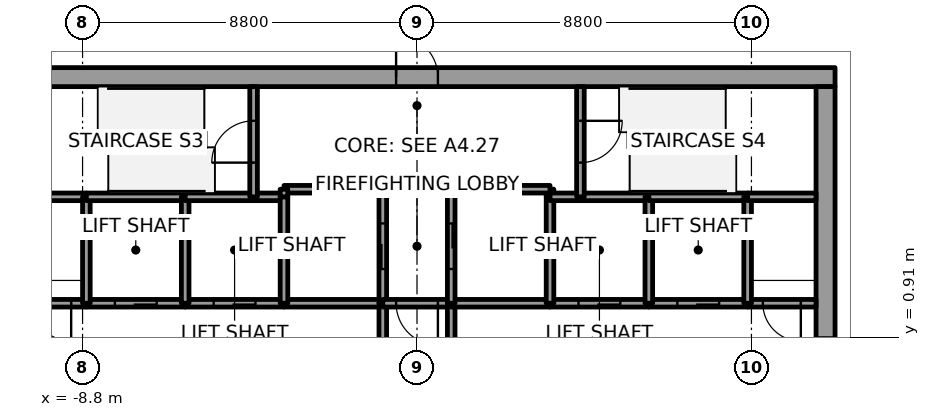
"""IFC4 building model, lengths in metres.
Left out: names, types, materials, properties, quantities, classifications, styles, units other than length and angle.
Written with IfcOpenShell. Run it as: python <this file> out.ifc"""

import sys

from ifc_helpers import new_model, si_unit, direction, frame, frame_2d, origin, place, context, subcontext, project, spatial, rectangle, extrude, element, fill, save


model = new_model("IFC4")
c1 = context("Model", 3, precision=1e-05, world=origin(), true_north=direction((0.0, 1.0)))
c2 = subcontext(c1, "Body", "Model", "MODEL_VIEW")
j1 = project(units=[si_unit("LENGTHUNIT", "METRE"), si_unit("PLANEANGLEUNIT", "RADIAN")], contexts=[c1])
p1 = place(None, origin())
s1 = spatial("IfcSite", under=j1, at=p1, CompositionType="ELEMENT")
p2 = place(p1, origin())
s2 = spatial("IfcBuilding", under=s1, at=p2, CompositionType="ELEMENT")
p3 = place(p2, frame((0.0, 0.0, 118.6)))
s3 = spatial("IfcBuildingStorey", under=s2, at=p3, CompositionType="ELEMENT", Elevation=118.6)
p4 = place(p3, frame((-11.0, 7.75, 0.0), z_axis=(0.0, 0.0, 1.0), x_axis=(1.0, 0.0, 0.0)))
e1 = element("IfcWall", 1, at=p4, inside=s3, PredefinedType="SHEAR", context=c2, shape_type="SweptSolid", body=[
    extrude(rectangle(XDim=22.0, YDim=0.5, at=frame_2d((11.0, 0.0))), origin(), (0.0, 0.0, 1.0), 7.2),
])
p5 = place(p4, frame((10.45, 0.0, 0.0)))
e2 = element("IfcOpeningElement", 2, at=p5, cuts=e1, PredefinedType="OPENING", context=c2, shape_type="SweptSolid", body=[
    extrude(rectangle(XDim=1.1, YDim=2.1, at=frame_2d((0.55, 1.05))), frame((0.0, 0.25, 0.0), z_axis=(0.0, -1.0, 0.0), x_axis=(1.0, 0.0, 0.0)), (0.0, 0.0, 1.0), 0.5),
])
p6 = place(p3, frame((10.75, -7.5, 0.0), z_axis=(0.0, 0.0, 1.0), x_axis=(0.0, 1.0, 0.0)))
e3 = element("IfcWall", 3, at=p6, inside=s3, PredefinedType="SHEAR", context=c2, shape_type="SweptSolid", body=[
    extrude(rectangle(XDim=15.0, YDim=0.5, at=frame_2d((7.5, 0.0))), origin(), (0.0, 0.0, 1.0), 7.2),
])
p7 = place(p6, frame((6.6, 0.0, 0.0)))
e4 = element("IfcOpeningElement", 4, at=p7, cuts=e3, PredefinedType="OPENING", context=c2, shape_type="SweptSolid", body=[
    extrude(rectangle(XDim=1.8, YDim=2.1, at=frame_2d((0.9, 1.05))), frame((0.0, 0.25, 0.0), z_axis=(0.0, -1.0, 0.0), x_axis=(1.0, 0.0, 0.0)), (0.0, 0.0, 1.0), 0.5),
])
p8 = place(p3, frame((-8.7, 1.8, 0.0), z_axis=(0.0, 0.0, 1.0), x_axis=(-1.0, 0.0, 0.0)))
e5 = element("IfcWall", 5, at=p8, inside=s3, PredefinedType="SOLIDWALL", context=c2, shape_type="SweptSolid", body=[
    extrude(rectangle(XDim=1.8, YDim=0.2, at=frame_2d((0.9, 0.0))), origin(), (0.0, 0.0, 1.0), 7.05),
])
p9 = place(p8, frame((0.4, 0.0, 0.0)))
e6 = element("IfcOpeningElement", 6, at=p9, cuts=e5, PredefinedType="OPENING", context=c2, shape_type="SweptSolid", body=[
    extrude(rectangle(XDim=1.0, YDim=2.1, at=frame_2d((0.5, 1.05))), frame((0.0, 0.1, 0.0), z_axis=(0.0, -1.0, 0.0), x_axis=(1.0, 0.0, 0.0)), (0.0, 0.0, 1.0), 0.2),
])
p10 = place(p3, frame((-8.7, 4.6, 0.0), z_axis=(0.0, 0.0, 1.0), x_axis=(-1.0, 0.0, 0.0)))
e7 = element("IfcWall", 7, at=p10, inside=s3, PredefinedType="SOLIDWALL", context=c2, shape_type="SweptSolid", body=[
    extrude(rectangle(XDim=1.8, YDim=0.2, at=frame_2d((0.9, 0.0))), origin(), (0.0, 0.0, 1.0), 7.05),
])
p11 = place(p3, frame((-6.1, 1.8, 0.0), z_axis=(0.0, 0.0, 1.0), x_axis=(-1.0, 0.0, 0.0)))
e8 = element("IfcWall", 8, at=p11, inside=s3, PredefinedType="SOLIDWALL", context=c2, shape_type="SweptSolid", body=[
    extrude(rectangle(XDim=2.6, YDim=0.2, at=frame_2d((1.3, 0.0))), origin(), (0.0, 0.0, 1.0), 7.05),
])
p12 = place(p11, frame((0.75, 0.0, 0.0)))
e9 = element("IfcOpeningElement", 9, at=p12, cuts=e8, PredefinedType="OPENING", context=c2, shape_type="SweptSolid", body=[
    extrude(rectangle(XDim=1.1, YDim=2.1, at=frame_2d((0.55, 1.05))), frame((0.0, 0.1, 0.0), z_axis=(0.0, -1.0, 0.0), x_axis=(1.0, 0.0, 0.0)), (0.0, 0.0, 1.0), 0.2),
])
p13 = place(p3, frame((-8.7, 1.8, 0.0), z_axis=(0.0, 0.0, 1.0), x_axis=(0.0, 1.0, 0.0)))
e10 = element("IfcWall", 10, at=p13, inside=s3, PredefinedType="SOLIDWALL", context=c2, shape_type="SweptSolid", body=[
    extrude(rectangle(XDim=2.8, YDim=0.2, at=frame_2d((1.4, 0.0))), origin(), (0.0, 0.0, 1.0), 7.05),
])
p14 = place(p3, frame((-6.1, 4.6, 0.0), z_axis=(0.0, 0.0, 1.0), x_axis=(-1.0, 0.0, 0.0)))
e11 = element("IfcWall", 11, at=p14, inside=s3, PredefinedType="SOLIDWALL", context=c2, shape_type="SweptSolid", body=[
    extrude(rectangle(XDim=2.6, YDim=0.2, at=frame_2d((1.3, 0.0))), origin(), (0.0, 0.0, 1.0), 7.05),
])
p15 = place(p3, frame((-3.5, 1.8, 0.0), z_axis=(0.0, 0.0, 1.0), x_axis=(-1.0, 0.0, 0.0)))
e12 = element("IfcWall", 12, at=p15, inside=s3, PredefinedType="SOLIDWALL", context=c2, shape_type="SweptSolid", body=[
    extrude(rectangle(XDim=2.6, YDim=0.2, at=frame_2d((1.3, 0.0))), origin(), (0.0, 0.0, 1.0), 7.05),
])
p16 = place(p15, frame((0.75, 0.0, 0.0)))
e13 = element("IfcOpeningElement", 13, at=p16, cuts=e12, PredefinedType="OPENING", context=c2, shape_type="SweptSolid", body=[
    extrude(rectangle(XDim=1.1, YDim=2.1, at=frame_2d((0.55, 1.05))), frame((0.0, 0.1, 0.0), z_axis=(0.0, -1.0, 0.0), x_axis=(1.0, 0.0, 0.0)), (0.0, 0.0, 1.0), 0.2),
])
p17 = place(p3, frame((-6.1, 1.8, 0.0), z_axis=(0.0, 0.0, 1.0), x_axis=(0.0, 1.0, 0.0)))
e14 = element("IfcWall", 14, at=p17, inside=s3, PredefinedType="SOLIDWALL", context=c2, shape_type="SweptSolid", body=[
    extrude(rectangle(XDim=2.8, YDim=0.2, at=frame_2d((1.4, 0.0))), origin(), (0.0, 0.0, 1.0), 7.05),
])
p18 = place(p3, frame((-4.3, 4.6, 0.0), z_axis=(0.0, 0.0, 1.0), x_axis=(-1.0, 0.0, 0.0)))
e15 = element("IfcWall", 15, at=p18, inside=s3, PredefinedType="SOLIDWALL", context=c2, shape_type="SweptSolid", body=[
    extrude(rectangle(XDim=1.8, YDim=0.2, at=frame_2d((0.9, 0.0))), origin(), (0.0, 0.0, 1.0), 7.05),
])
p19 = place(p3, frame((-3.5, 4.6, 0.0), z_axis=(0.0, 0.0, 1.0), x_axis=(-1.0, 0.0, 0.0)))
e16 = element("IfcWall", 16, at=p19, inside=s3, PredefinedType="SOLIDWALL", context=c2, shape_type="SweptSolid", body=[
    extrude(rectangle(XDim=0.8, YDim=0.2, at=frame_2d((0.4, 0.0))), origin(), (0.0, 0.0, 1.0), 7.05),
])
p20 = place(p3, frame((-4.3, 4.6, 0.0), z_axis=(0.0, 0.0, 1.0), x_axis=(0.0, 1.0, 0.0)))
e17 = element("IfcWall", 17, at=p20, inside=s3, PredefinedType="SOLIDWALL", context=c2, shape_type="SweptSolid", body=[
    extrude(rectangle(XDim=2.9, YDim=0.2, at=frame_2d((1.45, 0.0))), origin(), (0.0, 0.0, 1.0), 7.05),
])
p21 = place(p20, frame((0.9, 0.0, 0.0)))
e18 = element("IfcOpeningElement", 18, at=p21, cuts=e17, PredefinedType="OPENING", context=c2, shape_type="SweptSolid", body=[
    extrude(rectangle(XDim=1.1, YDim=2.1, at=frame_2d((0.55, 1.05))), frame((0.0, 0.1, 0.0), z_axis=(0.0, -1.0, 0.0), x_axis=(1.0, 0.0, 0.0)), (0.0, 0.0, 1.0), 0.2),
])
p22 = place(p3, frame((-0.9, 1.8, 0.0), z_axis=(0.0, 0.0, 1.0), x_axis=(-1.0, 0.0, 0.0)))
e19 = element("IfcWall", 19, at=p22, inside=s3, PredefinedType="SOLIDWALL", context=c2, shape_type="SweptSolid", body=[
    extrude(rectangle(XDim=2.6, YDim=0.2, at=frame_2d((1.3, 0.0))), origin(), (0.0, 0.0, 1.0), 7.05),
])
p23 = place(p3, frame((-3.5, 4.6, 0.0), z_axis=(0.0, 0.0, 1.0), x_axis=(0.0, -1.0, 0.0)))
e20 = element("IfcWall", 20, at=p23, inside=s3, PredefinedType="SOLIDWALL", context=c2, shape_type="SweptSolid", body=[
    extrude(rectangle(XDim=2.8, YDim=0.2, at=frame_2d((1.4, 0.0))), origin(), (0.0, 0.0, 1.0), 7.05),
])
p24 = place(p3, frame((-0.9, 1.8, 0.0), z_axis=(0.0, 0.0, 1.0), x_axis=(0.0, 1.0, 0.0)))
e21 = element("IfcWall", 21, at=p24, inside=s3, PredefinedType="SOLIDWALL", context=c2, shape_type="SweptSolid", body=[
    extrude(rectangle(XDim=3.0, YDim=0.2, at=frame_2d((1.5, 0.0))), origin(), (0.0, 0.0, 1.0), 7.05),
])
p25 = place(p24, frame((0.9, 0.0, 0.0)))
e22 = element("IfcOpeningElement", 22, at=p25, cuts=e21, PredefinedType="OPENING", context=c2, shape_type="SweptSolid", body=[
    extrude(rectangle(XDim=1.2, YDim=2.1, at=frame_2d((0.6, 1.05))), frame((0.0, 0.1, 0.0), z_axis=(0.0, -1.0, 0.0), x_axis=(1.0, 0.0, 0.0)), (0.0, 0.0, 1.0), 0.2),
])
p26 = place(p3, frame((-0.9, 4.8, 0.0), z_axis=(0.0, 0.0, 1.0), x_axis=(-1.0, 0.0, 0.0)))
e23 = element("IfcWall", 23, at=p26, inside=s3, PredefinedType="SOLIDWALL", context=c2, shape_type="SweptSolid", body=[
    extrude(rectangle(XDim=2.6, YDim=0.2, at=frame_2d((1.3, 0.0))), origin(), (0.0, 0.0, 1.0), 7.05),
])
p27 = place(p3, frame((-3.5, 4.8, 0.0), z_axis=(0.0, 0.0, 1.0), x_axis=(0.0, -1.0, 0.0)))
e24 = element("IfcWall", 24, at=p27, inside=s3, PredefinedType="SOLIDWALL", context=c2, shape_type="SweptSolid", body=[
    extrude(rectangle(XDim=0.2, YDim=0.2, at=frame_2d((0.1, 0.0))), origin(), (0.0, 0.0, 1.0), 7.05),
])
p28 = place(p3, frame((-0.9, 1.8, 0.0), z_axis=(0.0, 0.0, 1.0), x_axis=(0.0, -1.0, 0.0)))
e25 = element("IfcWall", 25, at=p28, inside=s3, PredefinedType="SOLIDWALL", context=c2, shape_type="SweptSolid", body=[
    extrude(rectangle(XDim=3.6, YDim=0.2, at=frame_2d((1.8, 0.0))), origin(), (0.0, 0.0, 1.0), 7.05),
])
p29 = place(p28, frame((1.05, 0.0, 0.0)))
e26 = element("IfcOpeningElement", 26, at=p29, cuts=e25, PredefinedType="OPENING", context=c2, shape_type="SweptSolid", body=[
    extrude(rectangle(XDim=1.5, YDim=2.1, at=frame_2d((0.75, 1.05))), frame((0.0, 0.1, 0.0), z_axis=(0.0, -1.0, 0.0), x_axis=(1.0, 0.0, 0.0)), (0.0, 0.0, 1.0), 0.2),
])
p30 = place(p3, frame((0.9, 1.8, 0.0), z_axis=(0.0, 0.0, 1.0), x_axis=(-1.0, 0.0, 0.0)))
e27 = element("IfcWall", 27, at=p30, inside=s3, PredefinedType="SOLIDWALL", context=c2, shape_type="SweptSolid", body=[
    extrude(rectangle(XDim=1.8, YDim=0.2, at=frame_2d((0.9, 0.0))), origin(), (0.0, 0.0, 1.0), 7.05),
])
p31 = place(p30, frame((0.35, 0.0, 0.0)))
e28 = element("IfcOpeningElement", 28, at=p31, cuts=e27, PredefinedType="OPENING", context=c2, shape_type="SweptSolid", body=[
    extrude(rectangle(XDim=1.1, YDim=2.1, at=frame_2d((0.55, 1.05))), frame((0.0, 0.1, 0.0), z_axis=(0.0, -1.0, 0.0), x_axis=(1.0, 0.0, 0.0)), (0.0, 0.0, 1.0), 0.2),
])
p32 = place(p3, frame((0.9, -1.8, 0.0), z_axis=(0.0, 0.0, 1.0), x_axis=(0.0, 1.0, 0.0)))
e29 = element("IfcWall", 29, at=p32, inside=s3, PredefinedType="SOLIDWALL", context=c2, shape_type="SweptSolid", body=[
    extrude(rectangle(XDim=3.6, YDim=0.2, at=frame_2d((1.8, 0.0))), origin(), (0.0, 0.0, 1.0), 7.05),
])
p33 = place(p32, frame((1.05, 0.0, 0.0)))
e30 = element("IfcOpeningElement", 30, at=p33, cuts=e29, PredefinedType="OPENING", context=c2, shape_type="SweptSolid", body=[
    extrude(rectangle(XDim=1.5, YDim=2.1, at=frame_2d((0.75, 1.05))), frame((0.0, 0.1, 0.0), z_axis=(0.0, -1.0, 0.0), x_axis=(1.0, 0.0, 0.0)), (0.0, 0.0, 1.0), 0.2),
])
p34 = place(p3, frame((3.5, 1.8, 0.0), z_axis=(0.0, 0.0, 1.0), x_axis=(-1.0, 0.0, 0.0)))
e31 = element("IfcWall", 31, at=p34, inside=s3, PredefinedType="SOLIDWALL", context=c2, shape_type="SweptSolid", body=[
    extrude(rectangle(XDim=2.6, YDim=0.2, at=frame_2d((1.3, 0.0))), origin(), (0.0, 0.0, 1.0), 7.05),
])
p35 = place(p3, frame((3.5, 4.6, 0.0), z_axis=(0.0, 0.0, 1.0), x_axis=(0.0, 1.0, 0.0)))
e32 = element("IfcWall", 32, at=p35, inside=s3, PredefinedType="SOLIDWALL", context=c2, shape_type="SweptSolid", body=[
    extrude(rectangle(XDim=0.2, YDim=0.2, at=frame_2d((0.1, 0.0))), origin(), (0.0, 0.0, 1.0), 7.05),
])
p36 = place(p3, frame((3.5, 4.8, 0.0), z_axis=(0.0, 0.0, 1.0), x_axis=(-1.0, 0.0, 0.0)))
e33 = element("IfcWall", 33, at=p36, inside=s3, PredefinedType="SOLIDWALL", context=c2, shape_type="SweptSolid", body=[
    extrude(rectangle(XDim=2.6, YDim=0.2, at=frame_2d((1.3, 0.0))), origin(), (0.0, 0.0, 1.0), 7.05),
])
p37 = place(p3, frame((0.9, 4.8, 0.0), z_axis=(0.0, 0.0, 1.0), x_axis=(0.0, -1.0, 0.0)))
e34 = element("IfcWall", 34, at=p37, inside=s3, PredefinedType="SOLIDWALL", context=c2, shape_type="SweptSolid", body=[
    extrude(rectangle(XDim=3.0, YDim=0.2, at=frame_2d((1.5, 0.0))), origin(), (0.0, 0.0, 1.0), 7.05),
])
p38 = place(p37, frame((0.9, 0.0, 0.0)))
e35 = element("IfcOpeningElement", 35, at=p38, cuts=e34, PredefinedType="OPENING", context=c2, shape_type="SweptSolid", body=[
    extrude(rectangle(XDim=1.2, YDim=2.1, at=frame_2d((0.6, 1.05))), frame((0.0, 0.1, 0.0), z_axis=(0.0, -1.0, 0.0), x_axis=(1.0, 0.0, 0.0)), (0.0, 0.0, 1.0), 0.2),
])
p39 = place(p3, frame((6.1, 1.8, 0.0), z_axis=(0.0, 0.0, 1.0), x_axis=(-1.0, 0.0, 0.0)))
e36 = element("IfcWall", 36, at=p39, inside=s3, PredefinedType="SOLIDWALL", context=c2, shape_type="SweptSolid", body=[
    extrude(rectangle(XDim=2.6, YDim=0.2, at=frame_2d((1.3, 0.0))), origin(), (0.0, 0.0, 1.0), 7.05),
])
p40 = place(p39, frame((0.75, 0.0, 0.0)))
e37 = element("IfcOpeningElement", 37, at=p40, cuts=e36, PredefinedType="OPENING", context=c2, shape_type="SweptSolid", body=[
    extrude(rectangle(XDim=1.1, YDim=2.1, at=frame_2d((0.55, 1.05))), frame((0.0, 0.1, 0.0), z_axis=(0.0, -1.0, 0.0), x_axis=(1.0, 0.0, 0.0)), (0.0, 0.0, 1.0), 0.2),
])
p41 = place(p3, frame((3.5, 1.8, 0.0), z_axis=(0.0, 0.0, 1.0), x_axis=(0.0, 1.0, 0.0)))
e38 = element("IfcWall", 38, at=p41, inside=s3, PredefinedType="SOLIDWALL", context=c2, shape_type="SweptSolid", body=[
    extrude(rectangle(XDim=2.8, YDim=0.2, at=frame_2d((1.4, 0.0))), origin(), (0.0, 0.0, 1.0), 7.05),
])
p42 = place(p3, frame((4.3, 4.6, 0.0), z_axis=(0.0, 0.0, 1.0), x_axis=(-1.0, 0.0, 0.0)))
e39 = element("IfcWall", 39, at=p42, inside=s3, PredefinedType="SOLIDWALL", context=c2, shape_type="SweptSolid", body=[
    extrude(rectangle(XDim=0.8, YDim=0.2, at=frame_2d((0.4, 0.0))), origin(), (0.0, 0.0, 1.0), 7.05),
])
p43 = place(p3, frame((6.1, 4.6, 0.0), z_axis=(0.0, 0.0, 1.0), x_axis=(-1.0, 0.0, 0.0)))
e40 = element("IfcWall", 40, at=p43, inside=s3, PredefinedType="SOLIDWALL", context=c2, shape_type="SweptSolid", body=[
    extrude(rectangle(XDim=1.8, YDim=0.2, at=frame_2d((0.9, 0.0))), origin(), (0.0, 0.0, 1.0), 7.05),
])
p44 = place(p3, frame((4.3, 7.5, 0.0), z_axis=(0.0, 0.0, 1.0), x_axis=(0.0, -1.0, 0.0)))
e41 = element("IfcWall", 41, at=p44, inside=s3, PredefinedType="SOLIDWALL", context=c2, shape_type="SweptSolid", body=[
    extrude(rectangle(XDim=2.9, YDim=0.2, at=frame_2d((1.45, 0.0))), origin(), (0.0, 0.0, 1.0), 7.05),
])
p45 = place(p44, frame((0.9, 0.0, 0.0)))
e42 = element("IfcOpeningElement", 42, at=p45, cuts=e41, PredefinedType="OPENING", context=c2, shape_type="SweptSolid", body=[
    extrude(rectangle(XDim=1.1, YDim=2.1, at=frame_2d((0.55, 1.05))), frame((0.0, 0.1, 0.0), z_axis=(0.0, -1.0, 0.0), x_axis=(1.0, 0.0, 0.0)), (0.0, 0.0, 1.0), 0.2),
])
p46 = place(p3, frame((8.7, 1.8, 0.0), z_axis=(0.0, 0.0, 1.0), x_axis=(-1.0, 0.0, 0.0)))
e43 = element("IfcWall", 43, at=p46, inside=s3, PredefinedType="SOLIDWALL", context=c2, shape_type="SweptSolid", body=[
    extrude(rectangle(XDim=2.6, YDim=0.2, at=frame_2d((1.3, 0.0))), origin(), (0.0, 0.0, 1.0), 7.05),
])
p47 = place(p46, frame((0.75, 0.0, 0.0)))
e44 = element("IfcOpeningElement", 44, at=p47, cuts=e43, PredefinedType="OPENING", context=c2, shape_type="SweptSolid", body=[
    extrude(rectangle(XDim=1.1, YDim=2.1, at=frame_2d((0.55, 1.05))), frame((0.0, 0.1, 0.0), z_axis=(0.0, -1.0, 0.0), x_axis=(1.0, 0.0, 0.0)), (0.0, 0.0, 1.0), 0.2),
])
p48 = place(p3, frame((6.1, 1.8, 0.0), z_axis=(0.0, 0.0, 1.0), x_axis=(0.0, 1.0, 0.0)))
e45 = element("IfcWall", 45, at=p48, inside=s3, PredefinedType="SOLIDWALL", context=c2, shape_type="SweptSolid", body=[
    extrude(rectangle(XDim=2.8, YDim=0.2, at=frame_2d((1.4, 0.0))), origin(), (0.0, 0.0, 1.0), 7.05),
])
p49 = place(p3, frame((8.7, 4.6, 0.0), z_axis=(0.0, 0.0, 1.0), x_axis=(-1.0, 0.0, 0.0)))
e46 = element("IfcWall", 46, at=p49, inside=s3, PredefinedType="SOLIDWALL", context=c2, shape_type="SweptSolid", body=[
    extrude(rectangle(XDim=2.6, YDim=0.2, at=frame_2d((1.3, 0.0))), origin(), (0.0, 0.0, 1.0), 7.05),
])
p50 = place(p3, frame((10.5, 1.8, 0.0), z_axis=(0.0, 0.0, 1.0), x_axis=(-1.0, 0.0, 0.0)))
e47 = element("IfcWall", 47, at=p50, inside=s3, PredefinedType="SOLIDWALL", context=c2, shape_type="SweptSolid", body=[
    extrude(rectangle(XDim=1.8, YDim=0.2, at=frame_2d((0.9, 0.0))), origin(), (0.0, 0.0, 1.0), 7.05),
])
p51 = place(p50, frame((0.4, 0.0, 0.0)))
e48 = element("IfcOpeningElement", 48, at=p51, cuts=e47, PredefinedType="OPENING", context=c2, shape_type="SweptSolid", body=[
    extrude(rectangle(XDim=1.0, YDim=2.1, at=frame_2d((0.5, 1.05))), frame((0.0, 0.1, 0.0), z_axis=(0.0, -1.0, 0.0), x_axis=(1.0, 0.0, 0.0)), (0.0, 0.0, 1.0), 0.2),
])
p52 = place(p3, frame((8.7, 4.6, 0.0), z_axis=(0.0, 0.0, 1.0), x_axis=(0.0, -1.0, 0.0)))
e49 = element("IfcWall", 49, at=p52, inside=s3, PredefinedType="SOLIDWALL", context=c2, shape_type="SweptSolid", body=[
    extrude(rectangle(XDim=2.8, YDim=0.2, at=frame_2d((1.4, 0.0))), origin(), (0.0, 0.0, 1.0), 7.05),
])
p53 = place(p3, frame((10.5, 4.6, 0.0), z_axis=(0.0, 0.0, 1.0), x_axis=(-1.0, 0.0, 0.0)))
e50 = element("IfcWall", 50, at=p53, inside=s3, PredefinedType="SOLIDWALL", context=c2, shape_type="SweptSolid", body=[
    extrude(rectangle(XDim=1.8, YDim=0.2, at=frame_2d((0.9, 0.0))), origin(), (0.0, 0.0, 1.0), 7.05),
])
p54 = place(p12, origin())
e51 = element("IfcDoor", 51, at=p54, inside=s3, OperationType="SLIDING_TO_LEFT", PredefinedType="DOOR", context=c2, shape_type="SweptSolid", body=[
    extrude(rectangle(XDim=1.1, YDim=2.1, at=frame_2d((0.55, 1.05))), frame((0.0, 0.025, 0.0), z_axis=(0.0, -1.0, 0.0), x_axis=(1.0, 0.0, 0.0)), (0.0, 0.0, 1.0), 0.05),
])
fill(e9, e51)
p55 = place(p16, origin())
e52 = element("IfcDoor", 52, at=p55, inside=s3, OperationType="SLIDING_TO_RIGHT", PredefinedType="DOOR", context=c2, shape_type="SweptSolid", body=[
    extrude(rectangle(XDim=1.1, YDim=2.1, at=frame_2d((0.55, 1.05))), frame((0.0, 0.025, 0.0), z_axis=(0.0, -1.0, 0.0), x_axis=(1.0, 0.0, 0.0)), (0.0, 0.0, 1.0), 0.05),
])
fill(e13, e52)
p56 = place(p40, origin())
e53 = element("IfcDoor", 53, at=p56, inside=s3, OperationType="SLIDING_TO_RIGHT", PredefinedType="DOOR", context=c2, shape_type="SweptSolid", body=[
    extrude(rectangle(XDim=1.1, YDim=2.1, at=frame_2d((0.55, 1.05))), frame((0.0, 0.025, 0.0), z_axis=(0.0, -1.0, 0.0), x_axis=(1.0, 0.0, 0.0)), (0.0, 0.0, 1.0), 0.05),
])
fill(e37, e53)
p57 = place(p47, origin())
e54 = element("IfcDoor", 54, at=p57, inside=s3, OperationType="SLIDING_TO_RIGHT", PredefinedType="DOOR", context=c2, shape_type="SweptSolid", body=[
    extrude(rectangle(XDim=1.1, YDim=2.1, at=frame_2d((0.55, 1.05))), frame((0.0, 0.025, 0.0), z_axis=(0.0, -1.0, 0.0), x_axis=(1.0, 0.0, 0.0)), (0.0, 0.0, 1.0), 0.05),
])
fill(e44, e54)
p58 = place(p25, origin())
e55 = element("IfcDoor", 55, at=p58, inside=s3, OperationType="SLIDING_TO_RIGHT", PredefinedType="DOOR", context=c2, shape_type="SweptSolid", body=[
    extrude(rectangle(XDim=1.2, YDim=2.1, at=frame_2d((0.6, 1.05))), frame((0.0, 0.025, 0.0), z_axis=(0.0, -1.0, 0.0), x_axis=(1.0, 0.0, 0.0)), (0.0, 0.0, 1.0), 0.05),
])
fill(e22, e55)
p59 = place(p38, origin())
e56 = element("IfcDoor", 56, at=p59, inside=s3, OperationType="SLIDING_TO_LEFT", PredefinedType="DOOR", context=c2, shape_type="SweptSolid", body=[
    extrude(rectangle(XDim=1.2, YDim=2.1, at=frame_2d((0.6, 1.05))), frame((0.0, 0.025, 0.0), z_axis=(0.0, -1.0, 0.0), x_axis=(1.0, 0.0, 0.0)), (0.0, 0.0, 1.0), 0.05),
])
fill(e35, e56)
p60 = place(p31, origin())
e57 = element("IfcDoor", 57, at=p60, inside=s3, OperationType="SINGLE_SWING_RIGHT", PredefinedType="DOOR", context=c2, shape_type="SweptSolid", body=[
    extrude(rectangle(XDim=1.1, YDim=2.1, at=frame_2d((0.55, 1.05))), frame((0.0, 0.025, 0.0), z_axis=(0.0, -1.0, 0.0), x_axis=(1.0, 0.0, 0.0)), (0.0, 0.0, 1.0), 0.05),
])
fill(e28, e57)
p61 = place(p9, origin())
e58 = element("IfcDoor", 58, at=p61, inside=s3, OperationType="SINGLE_SWING_RIGHT", PredefinedType="DOOR", context=c2, shape_type="SweptSolid", body=[
    extrude(rectangle(XDim=1.0, YDim=2.1, at=frame_2d((0.5, 1.05))), frame((0.0, 0.025, 0.0), z_axis=(0.0, -1.0, 0.0), x_axis=(1.0, 0.0, 0.0)), (0.0, 0.0, 1.0), 0.05),
])
fill(e6, e58)
p62 = place(p51, origin())
e59 = element("IfcDoor", 59, at=p62, inside=s3, OperationType="SINGLE_SWING_LEFT", PredefinedType="DOOR", context=c2, shape_type="SweptSolid", body=[
    extrude(rectangle(XDim=1.0, YDim=2.1, at=frame_2d((0.5, 1.05))), frame((0.0, 0.025, 0.0), z_axis=(0.0, -1.0, 0.0), x_axis=(1.0, 0.0, 0.0)), (0.0, 0.0, 1.0), 0.05),
])
fill(e48, e59)
p63 = place(p21, origin())
e60 = element("IfcDoor", 60, at=p63, inside=s3, OperationType="SINGLE_SWING_LEFT", PredefinedType="DOOR", context=c2, shape_type="SweptSolid", body=[
    extrude(rectangle(XDim=1.1, YDim=2.1, at=frame_2d((0.55, 1.05))), frame((0.0, 0.025, 0.0), z_axis=(0.0, -1.0, 0.0), x_axis=(1.0, 0.0, 0.0)), (0.0, 0.0, 1.0), 0.05),
])
fill(e18, e60)
p64 = place(p45, origin())
e61 = element("IfcDoor", 61, at=p64, inside=s3, OperationType="SINGLE_SWING_RIGHT", PredefinedType="DOOR", context=c2, shape_type="SweptSolid", body=[
    extrude(rectangle(XDim=1.1, YDim=2.1, at=frame_2d((0.55, 1.05))), frame((0.0, 0.025, 0.0), z_axis=(0.0, -1.0, 0.0), x_axis=(1.0, 0.0, 0.0)), (0.0, 0.0, 1.0), 0.05),
])
fill(e42, e61)
p65 = place(p7, origin())
e62 = element("IfcDoor", 62, at=p65, inside=s3, OperationType="DOUBLE_DOOR_SINGLE_SWING", PredefinedType="DOOR", context=c2, shape_type="SweptSolid", body=[
    extrude(rectangle(XDim=1.8, YDim=2.1, at=frame_2d((0.9, 1.05))), frame((0.0, 0.025, 0.0), z_axis=(0.0, -1.0, 0.0), x_axis=(1.0, 0.0, 0.0)), (0.0, 0.0, 1.0), 0.05),
])
fill(e4, e62)
p66 = place(p5, origin())
e63 = element("IfcDoor", 63, at=p66, inside=s3, OperationType="SINGLE_SWING_LEFT", PredefinedType="DOOR", context=c2, shape_type="SweptSolid", body=[
    extrude(rectangle(XDim=1.1, YDim=2.1, at=frame_2d((0.55, 1.05))), frame((0.0, 0.025, 0.0), z_axis=(0.0, -1.0, 0.0), x_axis=(1.0, 0.0, 0.0)), (0.0, 0.0, 1.0), 0.05),
])
fill(e2, e63)
save(model, sys.argv[1])
